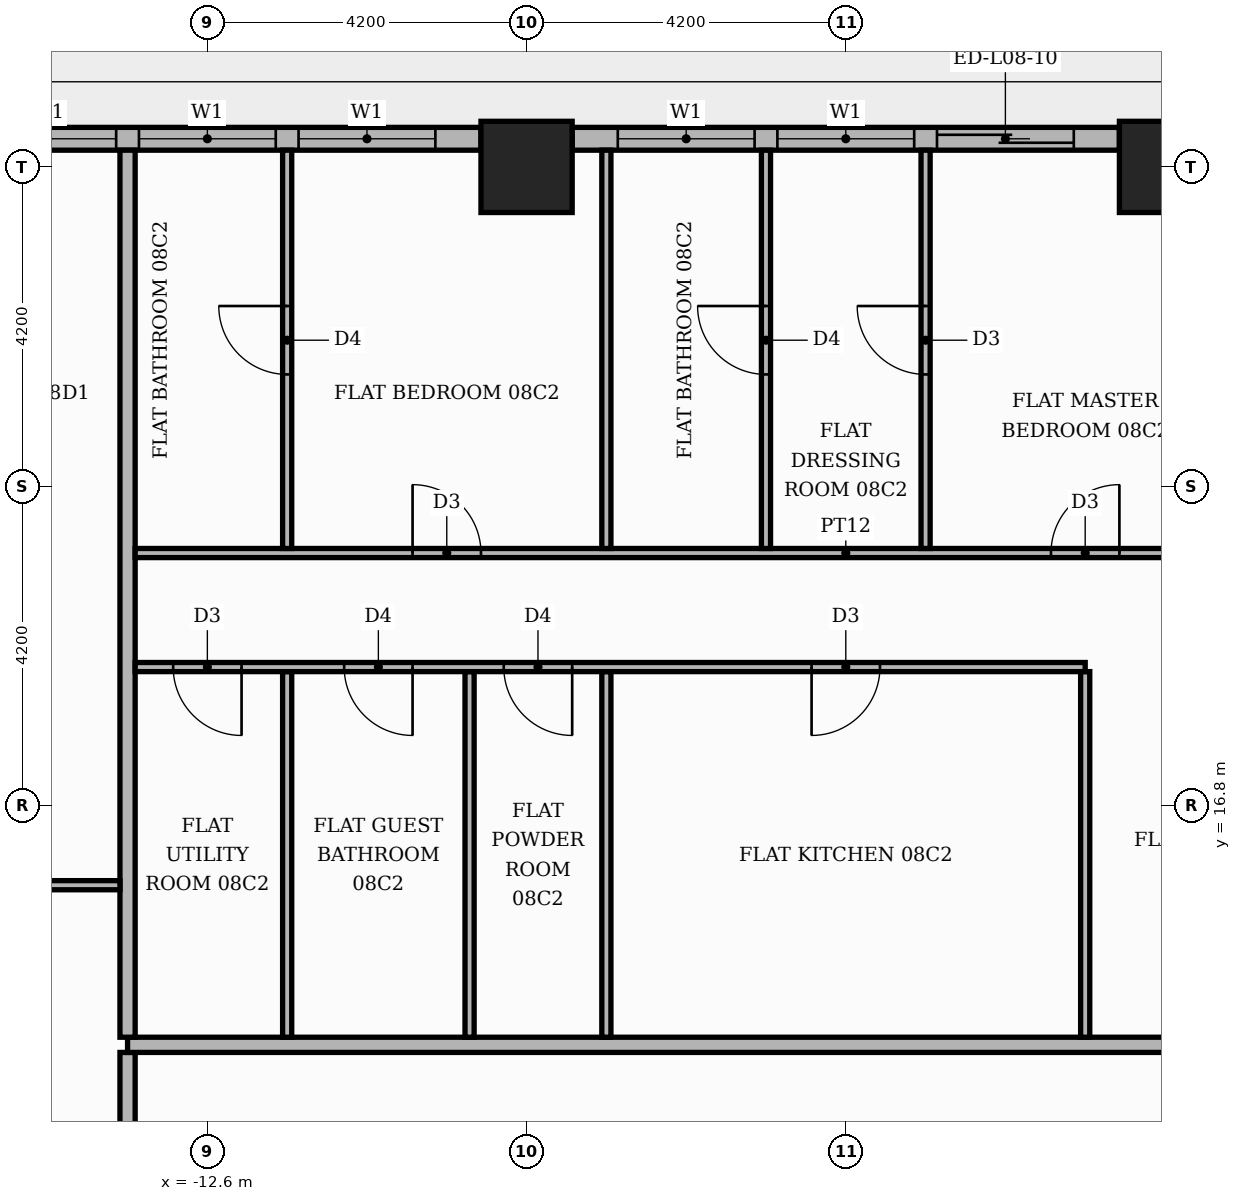
"""IFC4 building model, lengths in metres.
Left out: names, types, materials, properties, quantities, classifications, styles, units other than length and angle.
Written with IfcOpenShell. Run it as: python <this file> out.ifc"""

import sys

from ifc_helpers import new_model, si_unit, direction, frame, frame_2d, origin, origin_2d, place, context, subcontext, project, spatial, rectangle, extrude, element, fill, save


model = new_model("IFC4")
c1 = context("Model", 3, precision=1e-05, world=origin(), true_north=direction((0.0, 1.0)))
c2 = subcontext(c1, "Body", "Model", "MODEL_VIEW")
j1 = project(units=[si_unit("LENGTHUNIT", "METRE"), si_unit("PLANEANGLEUNIT", "RADIAN")], contexts=[c1])
p1 = place(None, origin())
s1 = spatial("IfcSite", under=j1, at=p1, CompositionType="ELEMENT")
p2 = place(p1, origin())
s2 = spatial("IfcBuilding", under=s1, at=p2, CompositionType="ELEMENT")
p3 = place(p2, frame((0.0, 0.0, 38.7)))
s3 = spatial("IfcBuildingStorey", under=s2, at=p3, CompositionType="ELEMENT", Elevation=38.7)
for number, where, z_axis, x_axis in (
    (1, (0.0, 25.2, 0.0), (0.0, 0.0, 1.0), (1.0, 0.0, 0.0)),
    (2, (-8.4, 25.2, 0.0), (0.0, 0.0, 1.0), (1.0, 0.0, 0.0)),
):
    element("IfcColumn", number, at=place(p3, frame(where, z_axis=z_axis, x_axis=x_axis)), inside=s3, PredefinedType="COLUMN", context=c2, shape_type="SweptSolid", body=[
        extrude(rectangle(XDim=1.2, YDim=1.2, at=origin_2d()), origin(), (0.0, 0.0, 1.0), 3.9),
    ])
p4 = place(p3, frame((-0.6, 25.57, 0.0), z_axis=(0.0, 0.0, 1.0), x_axis=(-1.0, 0.0, 0.0)))
e3 = element("IfcWall", 3, at=p4, inside=s3, PredefinedType="STANDARD", context=c2, shape_type="SweptSolid", body=[
    extrude(rectangle(XDim=7.2, YDim=0.3, at=frame_2d((3.6, 0.0))), origin(), (0.0, 0.0, 1.0), 3.48),
])
p5 = place(p4, frame((0.6, 0.0, 0.0)))
e4 = element("IfcOpeningElement", 4, at=p5, cuts=e3, PredefinedType="OPENING", context=c2, shape_type="SweptSolid", body=[
    extrude(rectangle(XDim=1.8, YDim=2.4, at=frame_2d((0.9, 1.2))), frame((0.0, 0.16, 0.0), z_axis=(0.0, -1.0, 0.0), x_axis=(1.0, 0.0, 0.0)), (0.0, 0.0, 1.0), 0.32),
])
p6 = place(p4, frame((2.7, 0.0, 0.9)))
e5 = element("IfcOpeningElement", 5, at=p6, cuts=e3, PredefinedType="OPENING", context=c2, shape_type="SweptSolid", body=[
    extrude(rectangle(XDim=1.8, YDim=2.1, at=frame_2d((0.9, 1.05))), frame((0.0, 0.16, 0.0), z_axis=(0.0, -1.0, 0.0), x_axis=(1.0, 0.0, 0.0)), (0.0, 0.0, 1.0), 0.32),
])
p7 = place(p4, frame((4.8, 0.0, 0.9)))
e6 = element("IfcOpeningElement", 6, at=p7, cuts=e3, PredefinedType="OPENING", context=c2, shape_type="SweptSolid", body=[
    extrude(rectangle(XDim=1.8, YDim=2.1, at=frame_2d((0.9, 1.05))), frame((0.0, 0.16, 0.0), z_axis=(0.0, -1.0, 0.0), x_axis=(1.0, 0.0, 0.0)), (0.0, 0.0, 1.0), 0.32),
])
p8 = place(p3, frame((-9.0, 25.57, 0.0), z_axis=(0.0, 0.0, 1.0), x_axis=(-1.0, 0.0, 0.0)))
e7 = element("IfcWall", 7, at=p8, inside=s3, PredefinedType="STANDARD", context=c2, shape_type="SweptSolid", body=[
    extrude(rectangle(XDim=7.2, YDim=0.3, at=frame_2d((3.6, 0.0))), origin(), (0.0, 0.0, 1.0), 3.48),
])
p9 = place(p8, frame((0.6, 0.0, 0.9)))
e8 = element("IfcOpeningElement", 8, at=p9, cuts=e7, PredefinedType="OPENING", context=c2, shape_type="SweptSolid", body=[
    extrude(rectangle(XDim=1.8, YDim=2.1, at=frame_2d((0.9, 1.05))), frame((0.0, 0.16, 0.0), z_axis=(0.0, -1.0, 0.0), x_axis=(1.0, 0.0, 0.0)), (0.0, 0.0, 1.0), 0.32),
])
p10 = place(p8, frame((2.7, 0.0, 0.9)))
e9 = element("IfcOpeningElement", 9, at=p10, cuts=e7, PredefinedType="OPENING", context=c2, shape_type="SweptSolid", body=[
    extrude(rectangle(XDim=1.8, YDim=2.1, at=frame_2d((0.9, 1.05))), frame((0.0, 0.16, 0.0), z_axis=(0.0, -1.0, 0.0), x_axis=(1.0, 0.0, 0.0)), (0.0, 0.0, 1.0), 0.32),
])
p11 = place(p8, frame((4.8, 0.0, 0.9)))
e10 = element("IfcOpeningElement", 10, at=p11, cuts=e7, PredefinedType="OPENING", context=c2, shape_type="SweptSolid", body=[
    extrude(rectangle(XDim=1.8, YDim=2.1, at=frame_2d((0.9, 1.05))), frame((0.0, 0.16, 0.0), z_axis=(0.0, -1.0, 0.0), x_axis=(1.0, 0.0, 0.0)), (0.0, 0.0, 1.0), 0.32),
])
p12 = place(p3, frame((-13.65, -13.55, 0.0), z_axis=(0.0, 0.0, 1.0), x_axis=(0.0, 1.0, 0.0)))
e11 = element("IfcWall", 11, at=p12, inside=s3, PredefinedType="PARTITIONING", context=c2, shape_type="SweptSolid", body=[
    extrude(rectangle(XDim=27.1, YDim=0.2, at=frame_2d((13.55, 0.0))), origin(), (0.0, 0.0, 1.0), 3.48),
])
p13 = place(p12, frame((24.55, 0.0, 0.0)))
e12 = element("IfcOpeningElement", 12, at=p13, cuts=e11, PredefinedType="OPENING", context=c2, shape_type="SweptSolid", body=[
    extrude(rectangle(XDim=1.1, YDim=2.4, at=frame_2d((0.55, 1.2))), frame((0.0, 0.11, 0.0), z_axis=(0.0, -1.0, 0.0), x_axis=(1.0, 0.0, 0.0)), (0.0, 0.0, 1.0), 0.22),
])
p14 = place(p3, frame((-13.65, 13.65, 0.0), z_axis=(0.0, 0.0, 1.0), x_axis=(1.0, 0.0, 0.0)))
e13 = element("IfcWall", 13, at=p14, inside=s3, PredefinedType="PARTITIONING", context=c2, shape_type="SweptSolid", body=[
    extrude(rectangle(XDim=39.07, YDim=0.2, at=frame_2d((19.535, 0.0))), origin(), (0.0, 0.0, 1.0), 3.48),
])
p15 = place(p14, frame((24.65, 0.0, 0.0)))
e14 = element("IfcOpeningElement", 14, at=p15, cuts=e13, PredefinedType="OPENING", context=c2, shape_type="SweptSolid", body=[
    extrude(rectangle(XDim=1.1, YDim=2.4, at=frame_2d((0.55, 1.2))), frame((0.0, 0.11, 0.0), z_axis=(0.0, -1.0, 0.0), x_axis=(1.0, 0.0, 0.0)), (0.0, 0.0, 1.0), 0.22),
])
p16 = place(p14, frame((14.15, 0.0, 0.0)))
e15 = element("IfcOpeningElement", 15, at=p16, cuts=e13, PredefinedType="OPENING", context=c2, shape_type="SweptSolid", body=[
    extrude(rectangle(XDim=1.1, YDim=2.4, at=frame_2d((0.55, 1.2))), frame((0.0, 0.11, 0.0), z_axis=(0.0, -1.0, 0.0), x_axis=(1.0, 0.0, 0.0)), (0.0, 0.0, 1.0), 0.22),
])
p17 = place(p3, frame((-13.65, 13.75, 0.0), z_axis=(0.0, 0.0, 1.0), x_axis=(0.0, 1.0, 0.0)))
e16 = element("IfcWall", 16, at=p17, inside=s3, PredefinedType="PARTITIONING", context=c2, shape_type="SweptSolid", body=[
    extrude(rectangle(XDim=11.67, YDim=0.2, at=frame_2d((5.835, 0.0))), origin(), (0.0, 0.0, 1.0), 3.48),
])
for number, where, z_axis, x_axis in (
    (17, (-11.55, 13.75, 0.0), (0.0, 0.0, 1.0), (0.0, 1.0, 0.0)),
    (18, (-9.15, 13.75, 0.0), (0.0, 0.0, 1.0), (0.0, 1.0, 0.0)),
    (19, (-7.35, 13.75, 0.0), (0.0, 0.0, 1.0), (0.0, 1.0, 0.0)),
    (20, (-1.05, 13.75, 0.0), (0.0, 0.0, 1.0), (0.0, 1.0, 0.0)),
):
    element("IfcWall", number, at=place(p3, frame(where, z_axis=z_axis, x_axis=x_axis)), inside=s3, PredefinedType="PARTITIONING", context=c2, shape_type="SweptSolid", body=[
        extrude(rectangle(XDim=4.81, YDim=0.12, at=frame_2d((2.405, 0.0))), origin(), (0.0, 0.0, 1.0), 3.48),
    ])
p18 = place(p3, frame((-20.72, 15.75, 0.0), z_axis=(0.0, 0.0, 1.0), x_axis=(1.0, 0.0, 0.0)))
e21 = element("IfcWall", 21, at=p18, inside=s3, PredefinedType="PARTITIONING", context=c2, shape_type="SweptSolid", body=[
    extrude(rectangle(XDim=6.97, YDim=0.12, at=frame_2d((3.485, 0.0))), origin(), (0.0, 0.0, 1.0), 3.48),
])
p19 = place(p18, frame((3.085, 0.0, 0.0)))
e22 = element("IfcOpeningElement", 22, at=p19, cuts=e21, PredefinedType="OPENING", context=c2, shape_type="SweptSolid", body=[
    extrude(rectangle(XDim=0.9, YDim=2.1, at=frame_2d((0.45, 1.05))), frame((0.0, 0.07, 0.0), z_axis=(0.0, -1.0, 0.0), x_axis=(1.0, 0.0, 0.0)), (0.0, 0.0, 1.0), 0.14),
])
p20 = place(p3, frame((-13.55, 18.62, 0.0), z_axis=(0.0, 0.0, 1.0), x_axis=(1.0, 0.0, 0.0)))
e23 = element("IfcWall", 23, at=p20, inside=s3, PredefinedType="PARTITIONING", context=c2, shape_type="SweptSolid", body=[
    extrude(rectangle(XDim=12.5, YDim=0.12, at=frame_2d((6.25, 0.0))), origin(), (0.0, 0.0, 1.0), 3.48),
])
p21 = place(p20, frame((8.9, 0.0, 0.0)))
e24 = element("IfcOpeningElement", 24, at=p21, cuts=e23, PredefinedType="OPENING", context=c2, shape_type="SweptSolid", body=[
    extrude(rectangle(XDim=0.9, YDim=2.1, at=frame_2d((0.45, 1.05))), frame((0.0, 0.07, 0.0), z_axis=(0.0, -1.0, 0.0), x_axis=(1.0, 0.0, 0.0)), (0.0, 0.0, 1.0), 0.14),
])
p22 = place(p20, frame((4.85, 0.0, 0.0)))
e25 = element("IfcOpeningElement", 25, at=p22, cuts=e23, PredefinedType="OPENING", context=c2, shape_type="SweptSolid", body=[
    extrude(rectangle(XDim=0.9, YDim=2.1, at=frame_2d((0.45, 1.05))), frame((0.0, 0.07, 0.0), z_axis=(0.0, -1.0, 0.0), x_axis=(1.0, 0.0, 0.0)), (0.0, 0.0, 1.0), 0.14),
])
p23 = place(p20, frame((2.75, 0.0, 0.0)))
e26 = element("IfcOpeningElement", 26, at=p23, cuts=e23, PredefinedType="OPENING", context=c2, shape_type="SweptSolid", body=[
    extrude(rectangle(XDim=0.9, YDim=2.1, at=frame_2d((0.45, 1.05))), frame((0.0, 0.07, 0.0), z_axis=(0.0, -1.0, 0.0), x_axis=(1.0, 0.0, 0.0)), (0.0, 0.0, 1.0), 0.14),
])
p24 = place(p20, frame((0.5, 0.0, 0.0)))
e27 = element("IfcOpeningElement", 27, at=p24, cuts=e23, PredefinedType="OPENING", context=c2, shape_type="SweptSolid", body=[
    extrude(rectangle(XDim=0.9, YDim=2.1, at=frame_2d((0.45, 1.05))), frame((0.0, 0.07, 0.0), z_axis=(0.0, -1.0, 0.0), x_axis=(1.0, 0.0, 0.0)), (0.0, 0.0, 1.0), 0.14),
])
p25 = place(p3, frame((-13.55, 20.12, 0.0), z_axis=(0.0, 0.0, 1.0), x_axis=(1.0, 0.0, 0.0)))
e28 = element("IfcWall", 28, at=p25, inside=s3, PredefinedType="PARTITIONING", context=c2, shape_type="SweptSolid", body=[
    extrude(rectangle(XDim=18.7, YDim=0.12, at=frame_2d((9.35, 0.0))), origin(), (0.0, 0.0, 1.0), 3.48),
])
p26 = place(p25, frame((16.2, 0.0, 0.0)))
e29 = element("IfcOpeningElement", 29, at=p26, cuts=e28, PredefinedType="OPENING", context=c2, shape_type="SweptSolid", body=[
    extrude(rectangle(XDim=1.0, YDim=2.1, at=frame_2d((0.5, 1.05))), frame((0.0, 0.07, 0.0), z_axis=(0.0, -1.0, 0.0), x_axis=(1.0, 0.0, 0.0)), (0.0, 0.0, 1.0), 0.14),
])
p27 = place(p25, frame((12.05, 0.0, 0.0)))
e30 = element("IfcOpeningElement", 30, at=p27, cuts=e28, PredefinedType="OPENING", context=c2, shape_type="SweptSolid", body=[
    extrude(rectangle(XDim=0.9, YDim=2.1, at=frame_2d((0.45, 1.05))), frame((0.0, 0.07, 0.0), z_axis=(0.0, -1.0, 0.0), x_axis=(1.0, 0.0, 0.0)), (0.0, 0.0, 1.0), 0.14),
])
p28 = place(p25, frame((3.65, 0.0, 0.0)))
e31 = element("IfcOpeningElement", 31, at=p28, cuts=e28, PredefinedType="OPENING", context=c2, shape_type="SweptSolid", body=[
    extrude(rectangle(XDim=0.9, YDim=2.1, at=frame_2d((0.45, 1.05))), frame((0.0, 0.07, 0.0), z_axis=(0.0, -1.0, 0.0), x_axis=(1.0, 0.0, 0.0)), (0.0, 0.0, 1.0), 0.14),
])
p29 = place(p3, frame((-11.55, 20.18, 0.0), z_axis=(0.0, 0.0, 1.0), x_axis=(0.0, 1.0, 0.0)))
e32 = element("IfcWall", 32, at=p29, inside=s3, PredefinedType="PARTITIONING", context=c2, shape_type="SweptSolid", body=[
    extrude(rectangle(XDim=5.24, YDim=0.12, at=frame_2d((2.62, 0.0))), origin(), (0.0, 0.0, 1.0), 3.48),
])
p30 = place(p29, frame((2.29, 0.0, 0.0)))
e33 = element("IfcOpeningElement", 33, at=p30, cuts=e32, PredefinedType="OPENING", context=c2, shape_type="SweptSolid", body=[
    extrude(rectangle(XDim=0.9, YDim=2.1, at=frame_2d((0.45, 1.05))), frame((0.0, 0.07, 0.0), z_axis=(0.0, -1.0, 0.0), x_axis=(1.0, 0.0, 0.0)), (0.0, 0.0, 1.0), 0.14),
])
p31 = place(p3, frame((-7.35, 20.18, 0.0), z_axis=(0.0, 0.0, 1.0), x_axis=(0.0, 1.0, 0.0)))
e34 = element("IfcWall", 34, at=p31, inside=s3, PredefinedType="PARTITIONING", context=c2, shape_type="SweptSolid", body=[
    extrude(rectangle(XDim=5.24, YDim=0.12, at=frame_2d((2.62, 0.0))), origin(), (0.0, 0.0, 1.0), 3.48),
])
p32 = place(p3, frame((-5.25, 20.18, 0.0), z_axis=(0.0, 0.0, 1.0), x_axis=(0.0, 1.0, 0.0)))
e35 = element("IfcWall", 35, at=p32, inside=s3, PredefinedType="PARTITIONING", context=c2, shape_type="SweptSolid", body=[
    extrude(rectangle(XDim=5.24, YDim=0.12, at=frame_2d((2.62, 0.0))), origin(), (0.0, 0.0, 1.0), 3.48),
])
p33 = place(p32, frame((2.29, 0.0, 0.0)))
e36 = element("IfcOpeningElement", 36, at=p33, cuts=e35, PredefinedType="OPENING", context=c2, shape_type="SweptSolid", body=[
    extrude(rectangle(XDim=0.9, YDim=2.1, at=frame_2d((0.45, 1.05))), frame((0.0, 0.07, 0.0), z_axis=(0.0, -1.0, 0.0), x_axis=(1.0, 0.0, 0.0)), (0.0, 0.0, 1.0), 0.14),
])
p34 = place(p3, frame((-3.15, 20.18, 0.0), z_axis=(0.0, 0.0, 1.0), x_axis=(0.0, 1.0, 0.0)))
e37 = element("IfcWall", 37, at=p34, inside=s3, PredefinedType="PARTITIONING", context=c2, shape_type="SweptSolid", body=[
    extrude(rectangle(XDim=5.24, YDim=0.12, at=frame_2d((2.62, 0.0))), origin(), (0.0, 0.0, 1.0), 3.48),
])
p35 = place(p34, frame((2.29, 0.0, 0.0)))
e38 = element("IfcOpeningElement", 38, at=p35, cuts=e37, PredefinedType="OPENING", context=c2, shape_type="SweptSolid", body=[
    extrude(rectangle(XDim=0.9, YDim=2.1, at=frame_2d((0.45, 1.05))), frame((0.0, 0.07, 0.0), z_axis=(0.0, -1.0, 0.0), x_axis=(1.0, 0.0, 0.0)), (0.0, 0.0, 1.0), 0.14),
])
p36 = place(p5, origin())
e39 = element("IfcDoor", 39, at=p36, inside=s3, OperationType="SLIDING_TO_LEFT", PredefinedType="DOOR", context=c2, shape_type="SweptSolid", body=[
    extrude(rectangle(XDim=1.8, YDim=2.4, at=frame_2d((0.9, 1.2))), frame((0.0, 0.025, 0.0), z_axis=(0.0, -1.0, 0.0), x_axis=(1.0, 0.0, 0.0)), (0.0, 0.0, 1.0), 0.05),
])
fill(e4, e39)
p37 = place(p6, origin())
e40 = element("IfcWindow", 40, at=p37, inside=s3, PartitioningType="SINGLE_PANEL", PredefinedType="WINDOW", context=c2, shape_type="SweptSolid", body=[
    extrude(rectangle(XDim=1.8, YDim=2.1, at=frame_2d((0.9, 1.05))), frame((0.0, 0.03, 0.0), z_axis=(0.0, -1.0, 0.0), x_axis=(1.0, 0.0, 0.0)), (0.0, 0.0, 1.0), 0.06),
])
fill(e5, e40)
p38 = place(p7, origin())
e41 = element("IfcWindow", 41, at=p38, inside=s3, PartitioningType="SINGLE_PANEL", PredefinedType="WINDOW", context=c2, shape_type="SweptSolid", body=[
    extrude(rectangle(XDim=1.8, YDim=2.1, at=frame_2d((0.9, 1.05))), frame((0.0, 0.03, 0.0), z_axis=(0.0, -1.0, 0.0), x_axis=(1.0, 0.0, 0.0)), (0.0, 0.0, 1.0), 0.06),
])
fill(e6, e41)
p39 = place(p9, origin())
e42 = element("IfcWindow", 42, at=p39, inside=s3, PartitioningType="SINGLE_PANEL", PredefinedType="WINDOW", context=c2, shape_type="SweptSolid", body=[
    extrude(rectangle(XDim=1.8, YDim=2.1, at=frame_2d((0.9, 1.05))), frame((0.0, 0.03, 0.0), z_axis=(0.0, -1.0, 0.0), x_axis=(1.0, 0.0, 0.0)), (0.0, 0.0, 1.0), 0.06),
])
fill(e8, e42)
p40 = place(p10, origin())
e43 = element("IfcWindow", 43, at=p40, inside=s3, PartitioningType="SINGLE_PANEL", PredefinedType="WINDOW", context=c2, shape_type="SweptSolid", body=[
    extrude(rectangle(XDim=1.8, YDim=2.1, at=frame_2d((0.9, 1.05))), frame((0.0, 0.03, 0.0), z_axis=(0.0, -1.0, 0.0), x_axis=(1.0, 0.0, 0.0)), (0.0, 0.0, 1.0), 0.06),
])
fill(e9, e43)
p41 = place(p11, origin())
e44 = element("IfcWindow", 44, at=p41, inside=s3, PartitioningType="SINGLE_PANEL", PredefinedType="WINDOW", context=c2, shape_type="SweptSolid", body=[
    extrude(rectangle(XDim=1.8, YDim=2.1, at=frame_2d((0.9, 1.05))), frame((0.0, 0.03, 0.0), z_axis=(0.0, -1.0, 0.0), x_axis=(1.0, 0.0, 0.0)), (0.0, 0.0, 1.0), 0.06),
])
fill(e10, e44)
p42 = place(p21, frame((0.9, 0.0, 0.0), z_axis=(0.0, 0.0, 1.0), x_axis=(-1.0, 0.0, 0.0)))
e45 = element("IfcDoor", 45, at=p42, inside=s3, OperationType="SINGLE_SWING_LEFT", PredefinedType="DOOR", context=c2, shape_type="SweptSolid", body=[
    extrude(rectangle(XDim=0.9, YDim=2.1, at=frame_2d((0.45, 1.05))), frame((0.0, 0.025, 0.0), z_axis=(0.0, -1.0, 0.0), x_axis=(1.0, 0.0, 0.0)), (0.0, 0.0, 1.0), 0.05),
])
fill(e24, e45)
p43 = place(p22, frame((0.9, 0.0, 0.0), z_axis=(0.0, 0.0, 1.0), x_axis=(-1.0, 0.0, 0.0)))
e46 = element("IfcDoor", 46, at=p43, inside=s3, OperationType="SINGLE_SWING_RIGHT", PredefinedType="DOOR", context=c2, shape_type="SweptSolid", body=[
    extrude(rectangle(XDim=0.9, YDim=2.1, at=frame_2d((0.45, 1.05))), frame((0.0, 0.025, 0.0), z_axis=(0.0, -1.0, 0.0), x_axis=(1.0, 0.0, 0.0)), (0.0, 0.0, 1.0), 0.05),
])
fill(e25, e46)
p44 = place(p23, frame((0.9, 0.0, 0.0), z_axis=(0.0, 0.0, 1.0), x_axis=(-1.0, 0.0, 0.0)))
e47 = element("IfcDoor", 47, at=p44, inside=s3, OperationType="SINGLE_SWING_RIGHT", PredefinedType="DOOR", context=c2, shape_type="SweptSolid", body=[
    extrude(rectangle(XDim=0.9, YDim=2.1, at=frame_2d((0.45, 1.05))), frame((0.0, 0.025, 0.0), z_axis=(0.0, -1.0, 0.0), x_axis=(1.0, 0.0, 0.0)), (0.0, 0.0, 1.0), 0.05),
])
fill(e26, e47)
p45 = place(p24, frame((0.9, 0.0, 0.0), z_axis=(0.0, 0.0, 1.0), x_axis=(-1.0, 0.0, 0.0)))
e48 = element("IfcDoor", 48, at=p45, inside=s3, OperationType="SINGLE_SWING_RIGHT", PredefinedType="DOOR", context=c2, shape_type="SweptSolid", body=[
    extrude(rectangle(XDim=0.9, YDim=2.1, at=frame_2d((0.45, 1.05))), frame((0.0, 0.025, 0.0), z_axis=(0.0, -1.0, 0.0), x_axis=(1.0, 0.0, 0.0)), (0.0, 0.0, 1.0), 0.05),
])
fill(e27, e48)
p46 = place(p27, origin())
e49 = element("IfcDoor", 49, at=p46, inside=s3, OperationType="SINGLE_SWING_RIGHT", PredefinedType="DOOR", context=c2, shape_type="SweptSolid", body=[
    extrude(rectangle(XDim=0.9, YDim=2.1, at=frame_2d((0.45, 1.05))), frame((0.0, 0.025, 0.0), z_axis=(0.0, -1.0, 0.0), x_axis=(1.0, 0.0, 0.0)), (0.0, 0.0, 1.0), 0.05),
])
fill(e30, e49)
p47 = place(p35, origin())
e50 = element("IfcDoor", 50, at=p47, inside=s3, OperationType="SINGLE_SWING_RIGHT", PredefinedType="DOOR", context=c2, shape_type="SweptSolid", body=[
    extrude(rectangle(XDim=0.9, YDim=2.1, at=frame_2d((0.45, 1.05))), frame((0.0, 0.025, 0.0), z_axis=(0.0, -1.0, 0.0), x_axis=(1.0, 0.0, 0.0)), (0.0, 0.0, 1.0), 0.05),
])
fill(e38, e50)
p48 = place(p33, origin())
e51 = element("IfcDoor", 51, at=p48, inside=s3, OperationType="SINGLE_SWING_RIGHT", PredefinedType="DOOR", context=c2, shape_type="SweptSolid", body=[
    extrude(rectangle(XDim=0.9, YDim=2.1, at=frame_2d((0.45, 1.05))), frame((0.0, 0.025, 0.0), z_axis=(0.0, -1.0, 0.0), x_axis=(1.0, 0.0, 0.0)), (0.0, 0.0, 1.0), 0.05),
])
fill(e36, e51)
p49 = place(p28, origin())
e52 = element("IfcDoor", 52, at=p49, inside=s3, OperationType="SINGLE_SWING_LEFT", PredefinedType="DOOR", context=c2, shape_type="SweptSolid", body=[
    extrude(rectangle(XDim=0.9, YDim=2.1, at=frame_2d((0.45, 1.05))), frame((0.0, 0.025, 0.0), z_axis=(0.0, -1.0, 0.0), x_axis=(1.0, 0.0, 0.0)), (0.0, 0.0, 1.0), 0.05),
])
fill(e31, e52)
p50 = place(p30, origin())
e53 = element("IfcDoor", 53, at=p50, inside=s3, OperationType="SINGLE_SWING_RIGHT", PredefinedType="DOOR", context=c2, shape_type="SweptSolid", body=[
    extrude(rectangle(XDim=0.9, YDim=2.1, at=frame_2d((0.45, 1.05))), frame((0.0, 0.025, 0.0), z_axis=(0.0, -1.0, 0.0), x_axis=(1.0, 0.0, 0.0)), (0.0, 0.0, 1.0), 0.05),
])
fill(e33, e53)
save(model, sys.argv[1])
